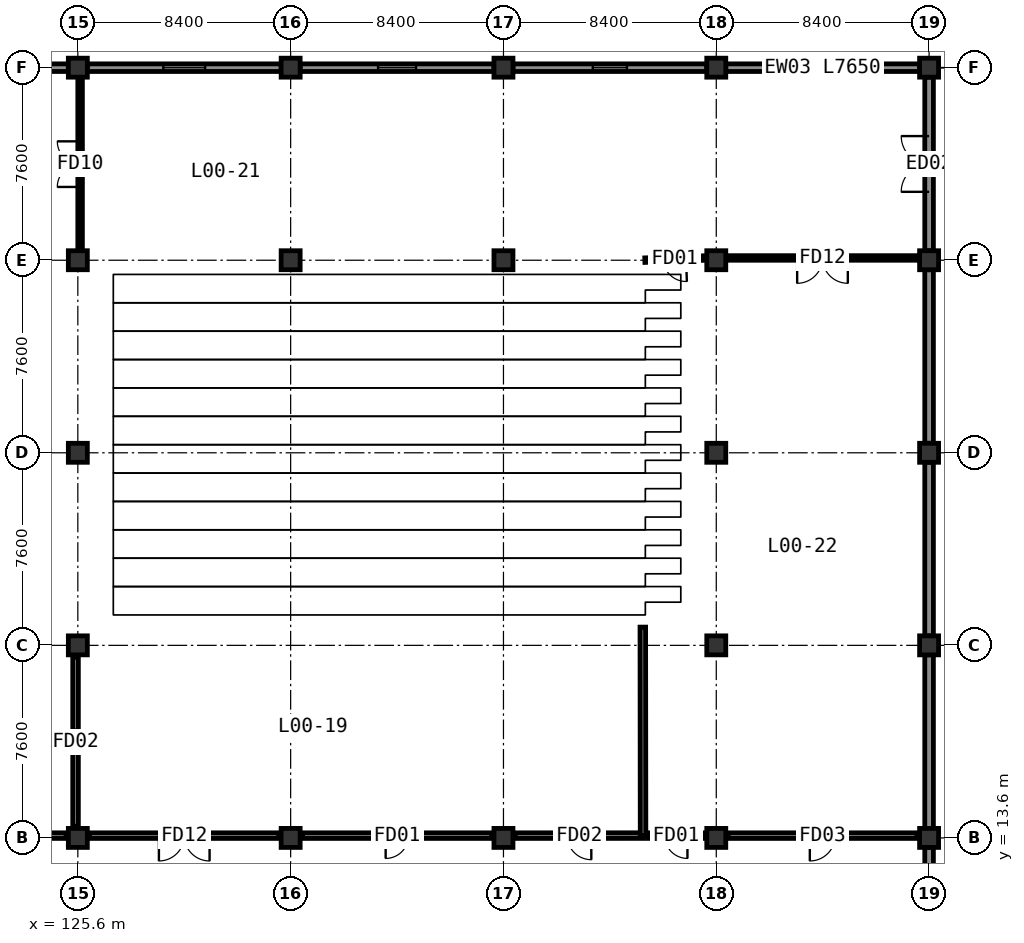
"""IFC4 building model, lengths in metres.
Left out: names, types, materials, properties, quantities, classifications, styles, units other than length and angle.
Written with IfcOpenShell. Run it as: python <this file> out.ifc"""

import sys

from ifc_helpers import new_model, si_unit, direction, frame, frame_2d, origin, origin_2d, place, context, subcontext, project, spatial, rectangle, extrude, element, fill, save


model = new_model("IFC4")
c1 = context("Model", 3, precision=1e-05, world=origin(), true_north=direction((0.0, 1.0)))
c2 = subcontext(c1, "Body", "Model", "MODEL_VIEW")
j1 = project(units=[si_unit("LENGTHUNIT", "METRE"), si_unit("PLANEANGLEUNIT", "RADIAN")], contexts=[c1])
p1 = place(None, origin())
s1 = spatial("IfcSite", under=j1, at=p1, CompositionType="ELEMENT")
p2 = place(p1, origin())
s2 = spatial("IfcBuilding", under=s1, at=p2, CompositionType="ELEMENT")
p3 = place(p2, origin())
s3 = spatial("IfcBuildingStorey", under=s2, at=p3, CompositionType="ELEMENT", Elevation=0.0)
for number, where, z_axis, x_axis in (
    (1, (125.6, 13.6, 0.0), (0.0, 0.0, 1.0), (1.0, 0.0, 0.0)),
    (2, (134.0, 13.6, 0.0), (0.0, 0.0, 1.0), (1.0, 0.0, 0.0)),
    (3, (142.4, 13.6, 0.0), (0.0, 0.0, 1.0), (1.0, 0.0, 0.0)),
    (4, (150.8, 13.6, 0.0), (0.0, 0.0, 1.0), (1.0, 0.0, 0.0)),
    (5, (159.2, 13.6, 0.0), (0.0, 0.0, 1.0), (1.0, 0.0, 0.0)),
    (6, (125.6, 21.2, 0.0), (0.0, 0.0, 1.0), (1.0, 0.0, 0.0)),
    (7, (150.8, 21.2, 0.0), (0.0, 0.0, 1.0), (1.0, 0.0, 0.0)),
    (8, (159.2, 21.2, 0.0), (0.0, 0.0, 1.0), (1.0, 0.0, 0.0)),
    (9, (125.6, 28.8, 0.0), (0.0, 0.0, 1.0), (1.0, 0.0, 0.0)),
    (10, (150.8, 28.8, 0.0), (0.0, 0.0, 1.0), (1.0, 0.0, 0.0)),
    (11, (159.2, 28.8, 0.0), (0.0, 0.0, 1.0), (1.0, 0.0, 0.0)),
    (12, (125.6, 36.4, 0.0), (0.0, 0.0, 1.0), (1.0, 0.0, 0.0)),
    (13, (134.0, 36.4, 0.0), (0.0, 0.0, 1.0), (1.0, 0.0, 0.0)),
    (14, (142.4, 36.4, 0.0), (0.0, 0.0, 1.0), (1.0, 0.0, 0.0)),
    (15, (150.8, 36.4, 0.0), (0.0, 0.0, 1.0), (1.0, 0.0, 0.0)),
    (16, (159.2, 36.4, 0.0), (0.0, 0.0, 1.0), (1.0, 0.0, 0.0)),
    (17, (125.6, 44.0, 0.0), (0.0, 0.0, 1.0), (1.0, 0.0, 0.0)),
    (18, (134.0, 44.0, 0.0), (0.0, 0.0, 1.0), (1.0, 0.0, 0.0)),
    (19, (142.4, 44.0, 0.0), (0.0, 0.0, 1.0), (1.0, 0.0, 0.0)),
    (20, (150.8, 44.0, 0.0), (0.0, 0.0, 1.0), (1.0, 0.0, 0.0)),
    (21, (159.2, 44.0, 0.0), (0.0, 0.0, 1.0), (1.0, 0.0, 0.0)),
):
    element("IfcColumn", number, at=place(p3, frame(where, z_axis=z_axis, x_axis=x_axis)), inside=s3, PredefinedType="COLUMN", context=c2, shape_type="SweptSolid", body=[
        extrude(rectangle(XDim=0.75, YDim=0.75, at=origin_2d()), origin(), (0.0, 0.0, 1.0), 4.8),
    ])
p4 = place(p3, frame((159.2, 6.45, 0.0), z_axis=(0.0, 0.0, 1.0), x_axis=(0.0, 1.0, 0.0)))
e22 = element("IfcWall", 22, at=p4, inside=s3, PredefinedType="SOLIDWALL", context=c2, shape_type="SweptSolid", body=[
    extrude(rectangle(XDim=6.775, YDim=0.34, at=frame_2d((3.388, 0.0))), origin(), (0.0, 0.0, 1.0), 4.237),
])
p5 = place(p4, frame((2.087, 0.0, 0.0)))
e23 = element("IfcOpeningElement", 23, at=p5, cuts=e22, PredefinedType="OPENING", context=c2, shape_type="SweptSolid", body=[
    extrude(rectangle(XDim=2.6, YDim=2.2, at=frame_2d((1.3, 1.1))), frame((0.0, 0.18, 0.0), z_axis=(0.0, -1.0, 0.0), x_axis=(1.0, 0.0, 0.0)), (0.0, 0.0, 1.0), 0.36),
])
p6 = place(p3, frame((159.2, 13.975, 0.0), z_axis=(0.0, 0.0, 1.0), x_axis=(0.0, 1.0, 0.0)))
e24 = element("IfcWall", 24, at=p6, inside=s3, PredefinedType="SOLIDWALL", context=c2, shape_type="SweptSolid", body=[
    extrude(rectangle(XDim=6.85, YDim=0.34, at=frame_2d((3.425, 0.0))), origin(), (0.0, 0.0, 1.0), 4.237),
])
p7 = place(p3, frame((159.2, 21.575, 0.0), z_axis=(0.0, 0.0, 1.0), x_axis=(0.0, 1.0, 0.0)))
e25 = element("IfcWall", 25, at=p7, inside=s3, PredefinedType="SOLIDWALL", context=c2, shape_type="SweptSolid", body=[
    extrude(rectangle(XDim=6.85, YDim=0.34, at=frame_2d((3.425, 0.0))), origin(), (0.0, 0.0, 1.0), 4.237),
])
p8 = place(p3, frame((159.2, 29.175, 0.0), z_axis=(0.0, 0.0, 1.0), x_axis=(0.0, 1.0, 0.0)))
e26 = element("IfcWall", 26, at=p8, inside=s3, PredefinedType="SOLIDWALL", context=c2, shape_type="SweptSolid", body=[
    extrude(rectangle(XDim=6.85, YDim=0.34, at=frame_2d((3.425, 0.0))), origin(), (0.0, 0.0, 1.0), 4.237),
])
p9 = place(p3, frame((159.2, 36.775, 0.0), z_axis=(0.0, 0.0, 1.0), x_axis=(0.0, 1.0, 0.0)))
e27 = element("IfcWall", 27, at=p9, inside=s3, PredefinedType="SOLIDWALL", context=c2, shape_type="SweptSolid", body=[
    extrude(rectangle(XDim=6.85, YDim=0.34, at=frame_2d((3.425, 0.0))), origin(), (0.0, 0.0, 1.0), 4.237),
])
p10 = place(p9, frame((2.325, 0.0, 0.0)))
e28 = element("IfcOpeningElement", 28, at=p10, cuts=e27, PredefinedType="OPENING", context=c2, shape_type="SweptSolid", body=[
    extrude(rectangle(XDim=2.2, YDim=2.4, at=frame_2d((1.1, 1.2))), frame((0.0, 0.18, 0.0), z_axis=(0.0, -1.0, 0.0), x_axis=(1.0, 0.0, 0.0)), (0.0, 0.0, 1.0), 0.36),
])
p11 = place(p3, frame((158.825, 44.0, 0.0), z_axis=(0.0, 0.0, 1.0), x_axis=(-1.0, 0.0, 0.0)))
e29 = element("IfcWall", 29, at=p11, inside=s3, PredefinedType="SOLIDWALL", context=c2, shape_type="SweptSolid", body=[
    extrude(rectangle(XDim=7.65, YDim=0.3, at=frame_2d((3.825, 0.0))), origin(), (0.0, 0.0, 1.0), 4.187),
])
p12 = place(p11, frame((3.225, 0.0, 0.95)))
e30 = element("IfcOpeningElement", 30, at=p12, cuts=e29, PredefinedType="OPENING", context=c2, shape_type="SweptSolid", body=[
    extrude(rectangle(XDim=1.2, YDim=1.8, at=frame_2d((0.6, 0.9))), frame((0.0, 0.16, 0.0), z_axis=(0.0, -1.0, 0.0), x_axis=(1.0, 0.0, 0.0)), (0.0, 0.0, 1.0), 0.32),
])
p13 = place(p3, frame((150.425, 44.0, 0.0), z_axis=(0.0, 0.0, 1.0), x_axis=(-1.0, 0.0, 0.0)))
e31 = element("IfcWall", 31, at=p13, inside=s3, PredefinedType="SOLIDWALL", context=c2, shape_type="SweptSolid", body=[
    extrude(rectangle(XDim=7.65, YDim=0.3, at=frame_2d((3.825, 0.0))), origin(), (0.0, 0.0, 1.0), 4.187),
])
p14 = place(p13, frame((3.15, 0.0, 0.95)))
e32 = element("IfcOpeningElement", 32, at=p14, cuts=e31, PredefinedType="OPENING", context=c2, shape_type="SweptSolid", body=[
    extrude(rectangle(XDim=1.35, YDim=1.8, at=frame_2d((0.675, 0.9))), frame((0.0, 0.16, 0.0), z_axis=(0.0, -1.0, 0.0), x_axis=(1.0, 0.0, 0.0)), (0.0, 0.0, 1.0), 0.32),
])
p15 = place(p3, frame((142.025, 44.0, 0.0), z_axis=(0.0, 0.0, 1.0), x_axis=(-1.0, 0.0, 0.0)))
e33 = element("IfcWall", 33, at=p15, inside=s3, PredefinedType="SOLIDWALL", context=c2, shape_type="SweptSolid", body=[
    extrude(rectangle(XDim=7.65, YDim=0.3, at=frame_2d((3.825, 0.0))), origin(), (0.0, 0.0, 1.0), 4.187),
])
p16 = place(p15, frame((3.075, 0.0, 0.95)))
e34 = element("IfcOpeningElement", 34, at=p16, cuts=e33, PredefinedType="OPENING", context=c2, shape_type="SweptSolid", body=[
    extrude(rectangle(XDim=1.5, YDim=1.8, at=frame_2d((0.75, 0.9))), frame((0.0, 0.16, 0.0), z_axis=(0.0, -1.0, 0.0), x_axis=(1.0, 0.0, 0.0)), (0.0, 0.0, 1.0), 0.32),
])
p17 = place(p3, frame((133.625, 44.0, 0.0), z_axis=(0.0, 0.0, 1.0), x_axis=(-1.0, 0.0, 0.0)))
e35 = element("IfcWall", 35, at=p17, inside=s3, PredefinedType="SOLIDWALL", context=c2, shape_type="SweptSolid", body=[
    extrude(rectangle(XDim=7.65, YDim=0.3, at=frame_2d((3.825, 0.0))), origin(), (0.0, 0.0, 1.0), 4.187),
])
p18 = place(p17, frame((3.0, 0.0, 0.95)))
e36 = element("IfcOpeningElement", 36, at=p18, cuts=e35, PredefinedType="OPENING", context=c2, shape_type="SweptSolid", body=[
    extrude(rectangle(XDim=1.65, YDim=1.8, at=frame_2d((0.825, 0.9))), frame((0.0, 0.16, 0.0), z_axis=(0.0, -1.0, 0.0), x_axis=(1.0, 0.0, 0.0)), (0.0, 0.0, 1.0), 0.32),
])
p19 = place(p3, frame((125.225, 44.0, 0.0), z_axis=(0.0, 0.0, 1.0), x_axis=(-1.0, 0.0, 0.0)))
e37 = element("IfcWall", 37, at=p19, inside=s3, PredefinedType="SOLIDWALL", context=c2, shape_type="SweptSolid", body=[
    extrude(rectangle(XDim=7.575, YDim=0.3, at=frame_2d((3.788, 0.0))), origin(), (0.0, 0.0, 1.0), 4.047),
])
p20 = place(p19, frame((2.887, 0.0, 0.95)))
e38 = element("IfcOpeningElement", 38, at=p20, cuts=e37, PredefinedType="OPENING", context=c2, shape_type="SweptSolid", body=[
    extrude(rectangle(XDim=1.8, YDim=1.8, at=frame_2d((0.9, 0.9))), frame((0.0, 0.16, 0.0), z_axis=(0.0, -1.0, 0.0), x_axis=(1.0, 0.0, 0.0)), (0.0, 0.0, 1.0), 0.32),
])
p21 = place(p3, frame((158.72, 36.49, 0.0), z_axis=(0.0, 0.0, 1.0), x_axis=(-1.0, 0.0, 0.0)))
e39 = element("IfcWall", 39, at=p21, inside=s3, PredefinedType="PARTITIONING", context=c2, shape_type="SweptSolid", body=[
    extrude(rectangle(XDim=7.455, YDim=0.18, at=frame_2d((3.728, 0.0))), origin(), (0.0, 0.0, 1.0), 3.95),
])
p22 = place(p21, frame((2.728, 0.0, 0.0)))
e40 = element("IfcOpeningElement", 40, at=p22, cuts=e39, PredefinedType="OPENING", context=c2, shape_type="SweptSolid", body=[
    extrude(rectangle(XDim=2.0, YDim=2.25, at=frame_2d((1.0, 1.125))), frame((0.0, 0.1, 0.0), z_axis=(0.0, -1.0, 0.0), x_axis=(1.0, 0.0, 0.0)), (0.0, 0.0, 1.0), 0.2),
])
p23 = place(p3, frame((150.335, 36.487, 0.0), z_axis=(0.0, 0.0, 1.0), x_axis=(-0.999360872917, -0.03574696746, 0.0)))
e41 = element("IfcWall", 41, at=p23, inside=s3, PredefinedType="PARTITIONING", context=c2, shape_type="SweptSolid", body=[
    extrude(rectangle(XDim=2.356, YDim=0.18, at=frame_2d((1.178, 0.0))), origin(), (0.0, 0.0, 1.0), 4.187),
])
p24 = place(p23, frame((0.728, 0.0, 0.0)))
e42 = element("IfcOpeningElement", 42, at=p24, cuts=e41, PredefinedType="OPENING", context=c2, shape_type="SweptSolid", body=[
    extrude(rectangle(XDim=0.9, YDim=2.1, at=frame_2d((0.45, 1.05))), frame((0.0, 0.1, 0.0), z_axis=(0.0, -1.0, 0.0), x_axis=(1.0, 0.0, 0.0)), (0.0, 0.0, 1.0), 0.2),
])
p25 = place(p3, frame((125.51, 20.735, 0.0), z_axis=(0.0, 0.0, 1.0), x_axis=(0.0, -1.0, 0.0)))
e43 = element("IfcWall", 43, at=p25, inside=s3, PredefinedType="SOLIDWALL", context=c2, shape_type="SweptSolid", body=[
    extrude(rectangle(XDim=6.67, YDim=0.22, at=frame_2d((3.335, 0.0))), origin(), (0.0, 0.0, 1.0), 3.95),
])
p26 = place(p25, frame((2.86, 0.0, 0.0)))
e44 = element("IfcOpeningElement", 44, at=p26, cuts=e43, PredefinedType="OPENING", context=c2, shape_type="SweptSolid", body=[
    extrude(rectangle(XDim=0.95, YDim=2.1, at=frame_2d((0.475, 1.05))), frame((0.0, 0.12, 0.0), z_axis=(0.0, -1.0, 0.0), x_axis=(1.0, 0.0, 0.0)), (0.0, 0.0, 1.0), 0.24),
])
p27 = place(p3, frame((133.535, 13.69, 0.0), z_axis=(0.0, 0.0, 1.0), x_axis=(-1.0, 0.0, 0.0)))
e45 = element("IfcWall", 45, at=p27, inside=s3, PredefinedType="SOLIDWALL", context=c2, shape_type="SweptSolid", body=[
    extrude(rectangle(XDim=7.47, YDim=0.22, at=frame_2d((3.735, 0.0))), origin(), (0.0, 0.0, 1.0), 4.187),
])
p28 = place(p27, frame((2.735, 0.0, 0.0)))
e46 = element("IfcOpeningElement", 46, at=p28, cuts=e45, PredefinedType="OPENING", context=c2, shape_type="SweptSolid", body=[
    extrude(rectangle(XDim=2.0, YDim=2.25, at=frame_2d((1.0, 1.125))), frame((0.0, 0.12, 0.0), z_axis=(0.0, -1.0, 0.0), x_axis=(1.0, 0.0, 0.0)), (0.0, 0.0, 1.0), 0.24),
])
p29 = place(p3, frame((141.935, 13.69, 0.0), z_axis=(0.0, 0.0, 1.0), x_axis=(-1.0, 0.0, 0.0)))
e47 = element("IfcWall", 47, at=p29, inside=s3, PredefinedType="SOLIDWALL", context=c2, shape_type="SweptSolid", body=[
    extrude(rectangle(XDim=7.47, YDim=0.22, at=frame_2d((3.735, 0.0))), origin(), (0.0, 0.0, 1.0), 4.187),
])
p30 = place(p29, frame((3.285, 0.0, 0.0)))
e48 = element("IfcOpeningElement", 48, at=p30, cuts=e47, PredefinedType="OPENING", context=c2, shape_type="SweptSolid", body=[
    extrude(rectangle(XDim=0.9, YDim=2.1, at=frame_2d((0.45, 1.05))), frame((0.0, 0.12, 0.0), z_axis=(0.0, -1.0, 0.0), x_axis=(1.0, 0.0, 0.0)), (0.0, 0.0, 1.0), 0.24),
])
p31 = place(p3, frame((147.92, 13.691, 0.0), z_axis=(0.0, 0.0, 1.0), x_axis=(-0.999999970842, -0.000241487556, 0.0)))
e49 = element("IfcWall", 49, at=p31, inside=s3, PredefinedType="SOLIDWALL", context=c2, shape_type="SweptSolid", body=[
    extrude(rectangle(XDim=5.055, YDim=0.22, at=frame_2d((2.527, 0.0))), origin(), (0.0, 0.0, 1.0), 4.187),
])
p32 = place(p31, frame((2.052, 0.0, 0.0)))
e50 = element("IfcOpeningElement", 50, at=p32, cuts=e49, PredefinedType="OPENING", context=c2, shape_type="SweptSolid", body=[
    extrude(rectangle(XDim=0.95, YDim=2.1, at=frame_2d((0.475, 1.05))), frame((0.0, 0.12, 0.0), z_axis=(0.0, -1.0, 0.0), x_axis=(1.0, 0.0, 0.0)), (0.0, 0.0, 1.0), 0.24),
])
p33 = place(p3, frame((158.72, 13.69, 0.0), z_axis=(0.0, 0.0, 1.0), x_axis=(-1.0, 0.0, 0.0)))
e51 = element("IfcWall", 51, at=p33, inside=s3, PredefinedType="SOLIDWALL", context=c2, shape_type="SweptSolid", body=[
    extrude(rectangle(XDim=7.455, YDim=0.22, at=frame_2d((3.728, 0.0))), origin(), (0.0, 0.0, 1.0), 3.95),
])
p34 = place(p33, frame((3.228, 0.0, 0.0)))
e52 = element("IfcOpeningElement", 52, at=p34, cuts=e51, PredefinedType="OPENING", context=c2, shape_type="SweptSolid", body=[
    extrude(rectangle(XDim=1.0, YDim=2.1, at=frame_2d((0.5, 1.05))), frame((0.0, 0.12, 0.0), z_axis=(0.0, -1.0, 0.0), x_axis=(1.0, 0.0, 0.0)), (0.0, 0.0, 1.0), 0.24),
])
p35 = place(p3, frame((150.335, 13.69, 0.0), z_axis=(0.0, 0.0, 1.0), x_axis=(-0.999999852155, 0.00054377371, 0.0)))
e53 = element("IfcWall", 53, at=p35, inside=s3, PredefinedType="SOLIDWALL", context=c2, shape_type="SweptSolid", body=[
    extrude(rectangle(XDim=2.245, YDim=0.22, at=frame_2d((1.123, 0.0))), origin(), (0.0, 0.0, 1.0), 4.187),
])
p36 = place(p35, frame((0.673, 0.0, 0.0)))
e54 = element("IfcOpeningElement", 54, at=p36, cuts=e53, PredefinedType="OPENING", context=c2, shape_type="SweptSolid", body=[
    extrude(rectangle(XDim=0.9, YDim=2.1, at=frame_2d((0.45, 1.05))), frame((0.0, 0.12, 0.0), z_axis=(0.0, -1.0, 0.0), x_axis=(1.0, 0.0, 0.0)), (0.0, 0.0, 1.0), 0.24),
])
p37 = place(p3, frame((125.69, 36.865, 0.0), z_axis=(0.0, 0.0, 1.0), x_axis=(0.0, 1.0, 0.0)))
e55 = element("IfcWall", 55, at=p37, inside=s3, PredefinedType="PARTITIONING", context=c2, shape_type="SweptSolid", body=[
    extrude(rectangle(XDim=6.655, YDim=0.18, at=frame_2d((3.328, 0.0))), origin(), (0.0, 0.0, 1.0), 3.95),
])
p38 = place(p37, frame((2.427, 0.0, 0.0)))
e56 = element("IfcOpeningElement", 56, at=p38, cuts=e55, PredefinedType="OPENING", context=c2, shape_type="SweptSolid", body=[
    extrude(rectangle(XDim=1.8, YDim=2.2, at=frame_2d((0.9, 1.1))), frame((0.0, 0.1, 0.0), z_axis=(0.0, -1.0, 0.0), x_axis=(1.0, 0.0, 0.0)), (0.0, 0.0, 1.0), 0.2),
])
p39 = place(p3, frame((125.135, 13.69, 0.0), z_axis=(0.0, 0.0, 1.0), x_axis=(-1.0, 0.0, 0.0)))
e57 = element("IfcWall", 57, at=p39, inside=s3, PredefinedType="SOLIDWALL", context=c2, shape_type="SweptSolid", body=[
    extrude(rectangle(XDim=7.395, YDim=0.22, at=frame_2d((3.698, 0.0))), origin(), (0.0, 0.0, 1.0), 3.81),
])
p40 = place(p39, frame((2.748, 0.0, 0.0)))
e58 = element("IfcOpeningElement", 58, at=p40, cuts=e57, PredefinedType="OPENING", context=c2, shape_type="SweptSolid", body=[
    extrude(rectangle(XDim=1.9, YDim=2.2, at=frame_2d((0.95, 1.1))), frame((0.0, 0.12, 0.0), z_axis=(0.0, -1.0, 0.0), x_axis=(1.0, 0.0, 0.0)), (0.0, 0.0, 1.0), 0.24),
])
p41 = place(p3, frame((147.901, 21.92, 0.0), z_axis=(0.0, 0.0, 1.0), x_axis=(0.001125891853, -0.999999366184, 0.0)))
e59 = element("IfcWall", 59, at=p41, inside=s3, PredefinedType="SOLIDWALL", context=c2, shape_type="SweptSolid", body=[
    extrude(rectangle(XDim=8.24, YDim=0.22, at=frame_2d((4.12, 0.0))), origin(), (0.0, 0.0, 1.0), 4.5),
])
p42 = place(p10, frame((2.2, 0.0, 0.0), z_axis=(0.0, 0.0, 1.0), x_axis=(-1.0, 0.0, 0.0)))
e60 = element("IfcDoor", 60, at=p42, inside=s3, OperationType="DOUBLE_DOOR_SINGLE_SWING", PredefinedType="DOOR", context=c2, shape_type="SweptSolid", body=[
    extrude(rectangle(XDim=2.2, YDim=2.4, at=frame_2d((1.1, 1.2))), frame((0.0, 0.025, 0.0), z_axis=(0.0, -1.0, 0.0), x_axis=(1.0, 0.0, 0.0)), (0.0, 0.0, 1.0), 0.05),
])
fill(e28, e60)
p43 = place(p12, origin())
e61 = element("IfcWindow", 61, at=p43, inside=s3, PartitioningType="SINGLE_PANEL", PredefinedType="WINDOW", context=c2, shape_type="SweptSolid", body=[
    extrude(rectangle(XDim=1.2, YDim=1.8, at=frame_2d((0.6, 0.9))), frame((0.0, 0.03, 0.0), z_axis=(0.0, -1.0, 0.0), x_axis=(1.0, 0.0, 0.0)), (0.0, 0.0, 1.0), 0.06),
])
fill(e30, e61)
p44 = place(p14, origin())
e62 = element("IfcWindow", 62, at=p44, inside=s3, PartitioningType="SINGLE_PANEL", PredefinedType="WINDOW", context=c2, shape_type="SweptSolid", body=[
    extrude(rectangle(XDim=1.35, YDim=1.8, at=frame_2d((0.675, 0.9))), frame((0.0, 0.03, 0.0), z_axis=(0.0, -1.0, 0.0), x_axis=(1.0, 0.0, 0.0)), (0.0, 0.0, 1.0), 0.06),
])
fill(e32, e62)
p45 = place(p16, origin())
e63 = element("IfcWindow", 63, at=p45, inside=s3, PartitioningType="SINGLE_PANEL", PredefinedType="WINDOW", context=c2, shape_type="SweptSolid", body=[
    extrude(rectangle(XDim=1.5, YDim=1.8, at=frame_2d((0.75, 0.9))), frame((0.0, 0.03, 0.0), z_axis=(0.0, -1.0, 0.0), x_axis=(1.0, 0.0, 0.0)), (0.0, 0.0, 1.0), 0.06),
])
fill(e34, e63)
p46 = place(p18, origin())
e64 = element("IfcWindow", 64, at=p46, inside=s3, PartitioningType="SINGLE_PANEL", PredefinedType="WINDOW", context=c2, shape_type="SweptSolid", body=[
    extrude(rectangle(XDim=1.65, YDim=1.8, at=frame_2d((0.825, 0.9))), frame((0.0, 0.03, 0.0), z_axis=(0.0, -1.0, 0.0), x_axis=(1.0, 0.0, 0.0)), (0.0, 0.0, 1.0), 0.06),
])
fill(e36, e64)
p47 = place(p22, origin())
e65 = element("IfcDoor", 65, at=p47, inside=s3, OperationType="DOUBLE_DOOR_SINGLE_SWING", PredefinedType="DOOR", context=c2, shape_type="SweptSolid", body=[
    extrude(rectangle(XDim=2.0, YDim=2.25, at=frame_2d((1.0, 1.125))), frame((0.0, 0.025, 0.0), z_axis=(0.0, -1.0, 0.0), x_axis=(1.0, 0.0, 0.0)), (0.0, 0.0, 1.0), 0.05),
])
fill(e40, e65)
p48 = place(p24, origin())
e66 = element("IfcDoor", 66, at=p48, inside=s3, OperationType="SINGLE_SWING_LEFT", PredefinedType="DOOR", context=c2, shape_type="SweptSolid", body=[
    extrude(rectangle(XDim=0.9, YDim=2.1, at=frame_2d((0.45, 1.05))), frame((0.0, 0.025, 0.0), z_axis=(0.0, -1.0, 0.0), x_axis=(1.0, 0.0, 0.0)), (0.0, 0.0, 1.0), 0.05),
])
fill(e42, e66)
p49 = place(p26, origin())
e67 = element("IfcDoor", 67, at=p49, inside=s3, OperationType="SINGLE_SWING_RIGHT", PredefinedType="DOOR", context=c2, shape_type="SweptSolid", body=[
    extrude(rectangle(XDim=0.95, YDim=2.1, at=frame_2d((0.475, 1.05))), frame((0.0, 0.025, 0.0), z_axis=(0.0, -1.0, 0.0), x_axis=(1.0, 0.0, 0.0)), (0.0, 0.0, 1.0), 0.05),
])
fill(e44, e67)
p50 = place(p28, origin())
e68 = element("IfcDoor", 68, at=p50, inside=s3, OperationType="DOUBLE_DOOR_SINGLE_SWING", PredefinedType="DOOR", context=c2, shape_type="SweptSolid", body=[
    extrude(rectangle(XDim=2.0, YDim=2.25, at=frame_2d((1.0, 1.125))), frame((0.0, 0.025, 0.0), z_axis=(0.0, -1.0, 0.0), x_axis=(1.0, 0.0, 0.0)), (0.0, 0.0, 1.0), 0.05),
])
fill(e46, e68)
p51 = place(p30, origin())
e69 = element("IfcDoor", 69, at=p51, inside=s3, OperationType="SINGLE_SWING_RIGHT", PredefinedType="DOOR", context=c2, shape_type="SweptSolid", body=[
    extrude(rectangle(XDim=0.9, YDim=2.1, at=frame_2d((0.45, 1.05))), frame((0.0, 0.025, 0.0), z_axis=(0.0, -1.0, 0.0), x_axis=(1.0, 0.0, 0.0)), (0.0, 0.0, 1.0), 0.05),
])
fill(e48, e69)
p52 = place(p32, origin())
e70 = element("IfcDoor", 70, at=p52, inside=s3, OperationType="SINGLE_SWING_LEFT", PredefinedType="DOOR", context=c2, shape_type="SweptSolid", body=[
    extrude(rectangle(XDim=0.95, YDim=2.1, at=frame_2d((0.475, 1.05))), frame((0.0, 0.025, 0.0), z_axis=(0.0, -1.0, 0.0), x_axis=(1.0, 0.0, 0.0)), (0.0, 0.0, 1.0), 0.05),
])
fill(e50, e70)
p53 = place(p34, origin())
e71 = element("IfcDoor", 71, at=p53, inside=s3, OperationType="SINGLE_SWING_RIGHT", PredefinedType="DOOR", context=c2, shape_type="SweptSolid", body=[
    extrude(rectangle(XDim=1.0, YDim=2.1, at=frame_2d((0.5, 1.05))), frame((0.0, 0.025, 0.0), z_axis=(0.0, -1.0, 0.0), x_axis=(1.0, 0.0, 0.0)), (0.0, 0.0, 1.0), 0.05),
])
fill(e52, e71)
p54 = place(p36, origin())
e72 = element("IfcDoor", 72, at=p54, inside=s3, OperationType="SINGLE_SWING_LEFT", PredefinedType="DOOR", context=c2, shape_type="SweptSolid", body=[
    extrude(rectangle(XDim=0.9, YDim=2.1, at=frame_2d((0.45, 1.05))), frame((0.0, 0.025, 0.0), z_axis=(0.0, -1.0, 0.0), x_axis=(1.0, 0.0, 0.0)), (0.0, 0.0, 1.0), 0.05),
])
fill(e54, e72)
p55 = place(p38, origin())
e73 = element("IfcDoor", 73, at=p55, inside=s3, OperationType="DOUBLE_DOOR_SINGLE_SWING", PredefinedType="DOOR", context=c2, shape_type="SweptSolid", body=[
    extrude(rectangle(XDim=1.8, YDim=2.2, at=frame_2d((0.9, 1.1))), frame((0.0, 0.025, 0.0), z_axis=(0.0, -1.0, 0.0), x_axis=(1.0, 0.0, 0.0)), (0.0, 0.0, 1.0), 0.05),
])
fill(e56, e73)
save(model, sys.argv[1])
